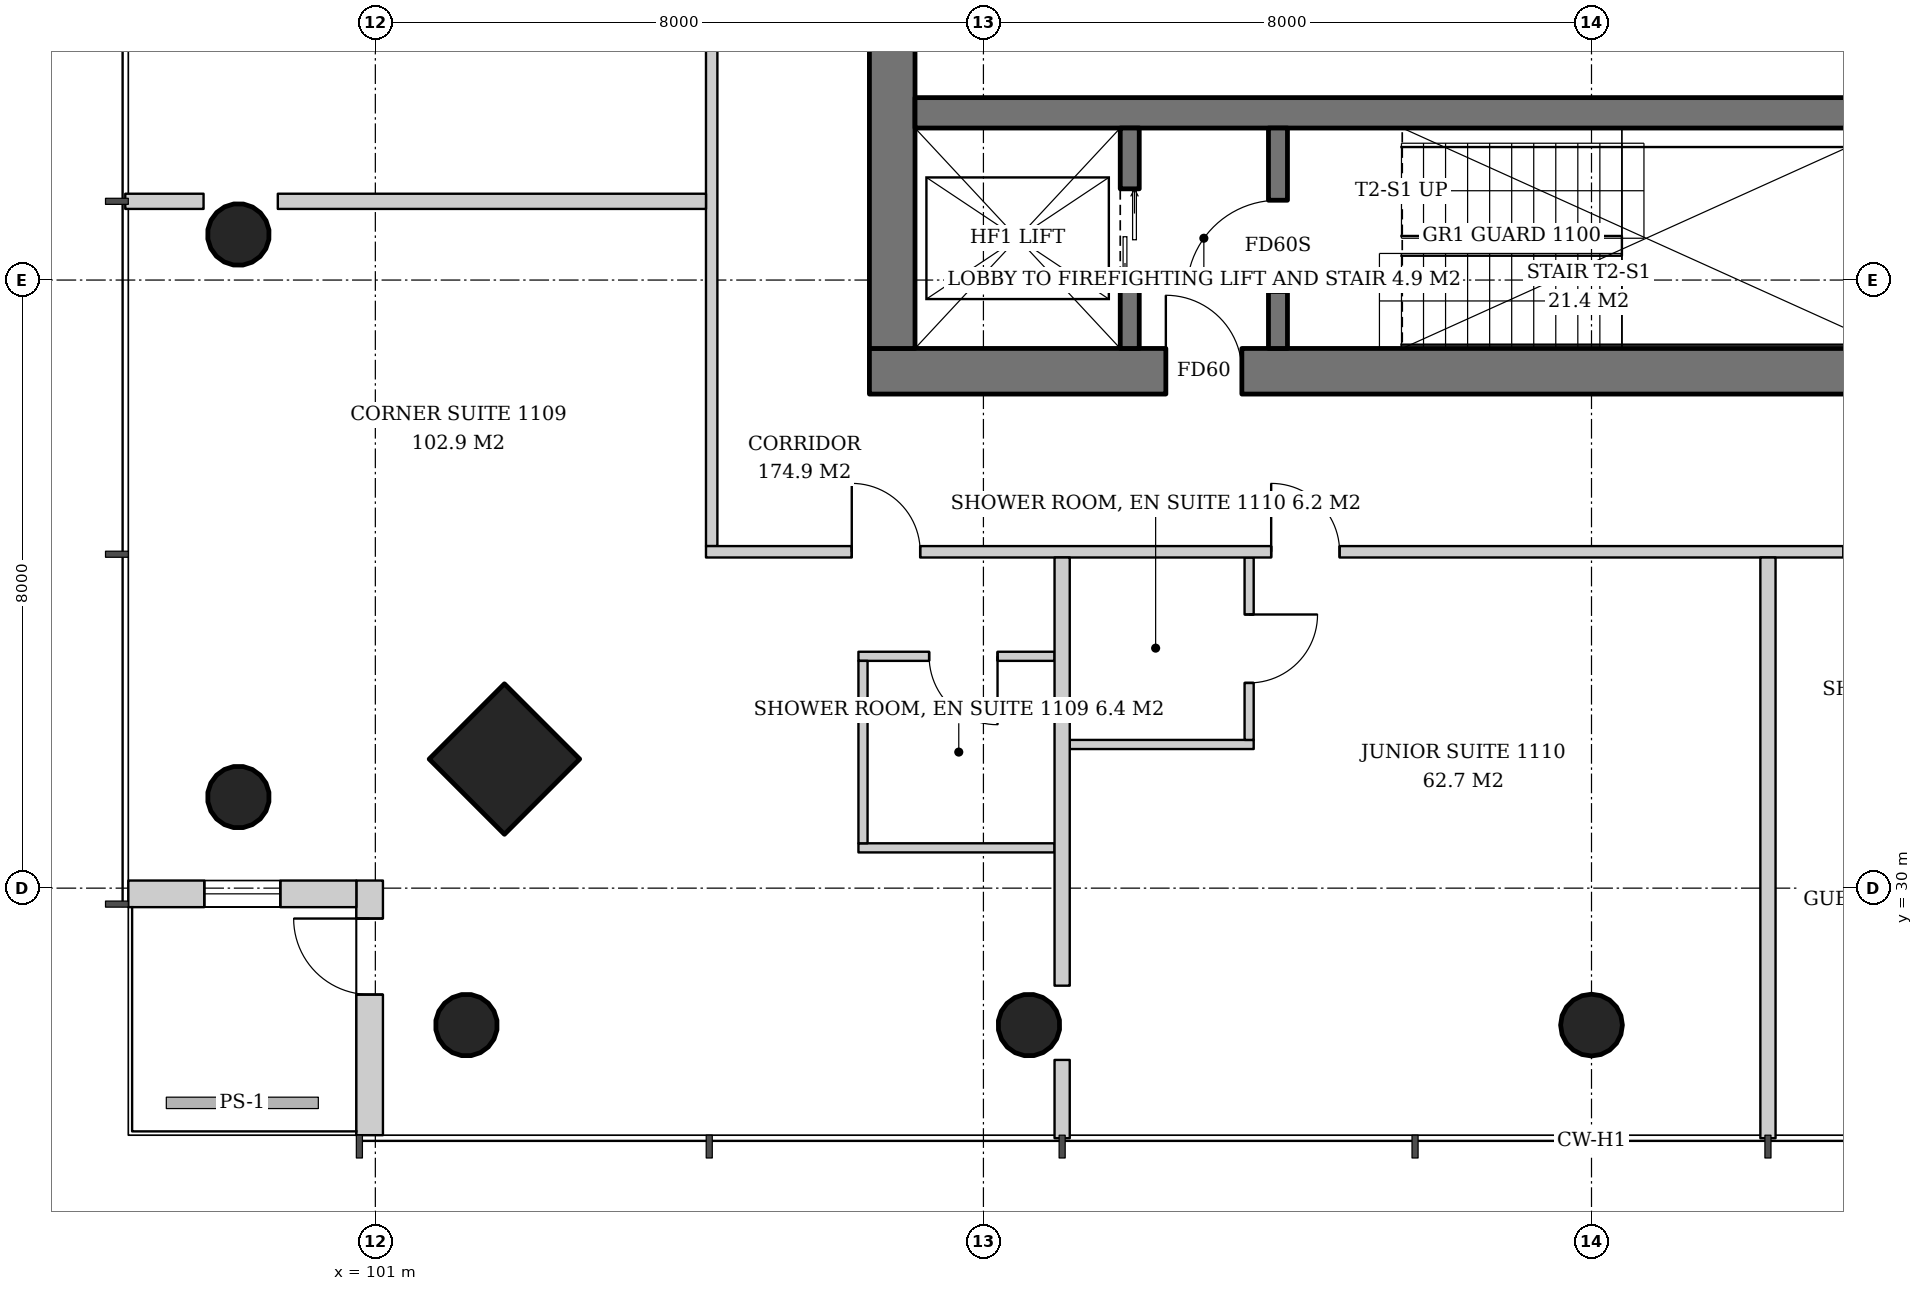
"""IFC4 building model, lengths in metres.
Left out: names, types, materials, properties, quantities, classifications, styles, units other than length and angle.
Written with IfcOpenShell. Run it as: python <this file> out.ifc"""

import sys

from ifc_helpers import new_model, si_unit, direction, frame, frame_2d, origin, origin_2d, place, context, subcontext, project, spatial, rectangle, hollow_circle, extrude, element, fill, save


model = new_model("IFC4")
c1 = context("Model", 3, precision=1e-05, world=origin(), true_north=direction((0.0, 1.0)))
c2 = subcontext(c1, "Body", "Model", "MODEL_VIEW")
j1 = project(units=[si_unit("LENGTHUNIT", "METRE"), si_unit("PLANEANGLEUNIT", "RADIAN")], contexts=[c1])
p1 = place(None, origin())
s1 = spatial("IfcSite", under=j1, at=p1, CompositionType="ELEMENT")
p2 = place(p1, origin())
s2 = spatial("IfcBuilding", under=s1, at=p2, CompositionType="ELEMENT")
p3 = place(p2, frame((0.0, 0.0, 47.6)))
s3 = spatial("IfcBuildingStorey", under=s2, at=p3, CompositionType="ELEMENT", Elevation=47.6)
p4 = place(p3, frame((102.646, 31.646, 0.0), z_axis=(0.043032401563, 0.043032401563, 0.998146494675), x_axis=(-0.707106781187, 0.707106781187, 0.0)))
e1 = element("IfcColumn", 1, at=p4, inside=s3, PredefinedType="COLUMN", context=c2, shape_type="SweptSolid", body=[
    extrude(rectangle(XDim=1.4, YDim=1.4, at=origin_2d()), origin(), (0.0, 0.0, 1.0), 3.807),
])
p5 = place(p3, frame((99.146, 31.146, 0.0), z_axis=(0.043032401563, 0.043032401563, 0.998146494675), x_axis=(-0.707106781187, 0.707106781187, 0.0)))
e2 = element("IfcColumn", 2, at=p5, inside=s3, PredefinedType="COLUMN", context=c2, shape_type="SweptSolid", body=[
    extrude(hollow_circle(Radius=0.406, WallThickness=0.03, at=origin_2d()), origin(), (0.0, 0.0, 1.0), 3.807),
])
p6 = place(p3, frame((99.146, 38.573, 0.0), z_axis=(0.043062285527, 0.021563230905, 0.998839660125), x_axis=(-0.44774654769, 0.894160516368, 0.0)))
e3 = element("IfcColumn", 3, at=p6, inside=s3, PredefinedType="COLUMN", context=c2, shape_type="SweptSolid", body=[
    extrude(hollow_circle(Radius=0.406, WallThickness=0.03, at=origin_2d()), origin(), (0.0, 0.0, 1.0), 3.804),
])
p7 = place(p3, frame((102.146, 28.146, 0.0), z_axis=(0.043032401563, 0.043032401563, 0.998146494675), x_axis=(-0.707106781187, 0.707106781187, 0.0)))
e4 = element("IfcColumn", 4, at=p7, inside=s3, PredefinedType="COLUMN", context=c2, shape_type="SweptSolid", body=[
    extrude(hollow_circle(Radius=0.406, WallThickness=0.03, at=origin_2d()), origin(), (0.0, 0.0, 1.0), 3.807),
])
p8 = place(p3, frame((109.573, 28.146, 0.0), z_axis=(0.021563230905, 0.043062285527, 0.998839660125), x_axis=(-0.894160516368, 0.44774654769, 0.0)))
e5 = element("IfcColumn", 5, at=p8, inside=s3, PredefinedType="COLUMN", context=c2, shape_type="SweptSolid", body=[
    extrude(hollow_circle(Radius=0.406, WallThickness=0.03, at=origin_2d()), origin(), (0.0, 0.0, 1.0), 3.804),
])
p9 = place(p3, frame((117.0, 28.146, 0.0), z_axis=(0.0, 0.043072300418, 0.999071957837), x_axis=(-1.0, 0.0, 0.0)))
e6 = element("IfcColumn", 6, at=p9, inside=s3, PredefinedType="COLUMN", context=c2, shape_type="SweptSolid", body=[
    extrude(hollow_circle(Radius=0.406, WallThickness=0.03, at=origin_2d()), origin(), (0.0, 0.0, 1.0), 3.803),
])
p10 = place(p3, frame((107.5, 36.8, 0.0), z_axis=(0.0, 0.0, 1.0), x_axis=(1.0, 0.0, 0.0)))
e7 = element("IfcWall", 7, at=p10, inside=s3, PredefinedType="SHEAR", context=c2, shape_type="SweptSolid", body=[
    extrude(rectangle(XDim=19.0, YDim=0.6, at=frame_2d((9.5, 0.0))), origin(), (0.0, 0.0, 1.0), 3.8),
])
p11 = place(p10, frame((3.9, 0.0, 0.0)))
e8 = element("IfcOpeningElement", 8, at=p11, cuts=e7, PredefinedType="OPENING", context=c2, shape_type="SweptSolid", body=[
    extrude(rectangle(XDim=1.0, YDim=2.1, at=frame_2d((0.5, 1.05))), frame((0.0, 0.31, 0.0), z_axis=(0.0, -1.0, 0.0), x_axis=(1.0, 0.0, 0.0)), (0.0, 0.0, 1.0), 0.62),
])
p12 = place(p10, frame((14.153, 0.0, 0.0)))
e9 = element("IfcOpeningElement", 9, at=p12, cuts=e7, PredefinedType="OPENING", context=c2, shape_type="SweptSolid", body=[
    extrude(rectangle(XDim=1.0, YDim=2.1, at=frame_2d((0.5, 1.05))), frame((0.0, 0.31, 0.0), z_axis=(0.0, -1.0, 0.0), x_axis=(1.0, 0.0, 0.0)), (0.0, 0.0, 1.0), 0.62),
])
p13 = place(p10, frame((15.725, 0.0, 0.0)))
e10 = element("IfcOpeningElement", 10, at=p13, cuts=e7, PredefinedType="OPENING", context=c2, shape_type="SweptSolid", body=[
    extrude(rectangle(XDim=1.0, YDim=2.1, at=frame_2d((0.5, 1.05))), frame((0.0, 0.31, 0.0), z_axis=(0.0, -1.0, 0.0), x_axis=(1.0, 0.0, 0.0)), (0.0, 0.0, 1.0), 0.62),
])
p14 = place(p10, frame((17.188, 0.0, 0.0)))
e11 = element("IfcOpeningElement", 11, at=p14, cuts=e7, PredefinedType="OPENING", context=c2, shape_type="SweptSolid", body=[
    extrude(rectangle(XDim=1.0, YDim=2.1, at=frame_2d((0.5, 1.05))), frame((0.0, 0.31, 0.0), z_axis=(0.0, -1.0, 0.0), x_axis=(1.0, 0.0, 0.0)), (0.0, 0.0, 1.0), 0.62),
])
p15 = place(p3, frame((107.8, 37.1, 0.0), z_axis=(0.0, 0.0, 1.0), x_axis=(0.0, 1.0, 0.0)))
e12 = element("IfcWall", 12, at=p15, inside=s3, PredefinedType="SHEAR", context=c2, shape_type="SweptSolid", body=[
    extrude(rectangle(XDim=17.8, YDim=0.6, at=frame_2d((8.9, 0.0))), origin(), (0.0, 0.0, 1.0), 3.8),
])
p16 = place(p15, frame((8.0, 0.0, 0.0)))
e13 = element("IfcOpeningElement", 13, at=p16, cuts=e12, PredefinedType="OPENING", context=c2, shape_type="SweptSolid", body=[
    extrude(rectangle(XDim=1.8, YDim=2.4, at=frame_2d((0.9, 1.2))), frame((0.0, 0.31, 0.0), z_axis=(0.0, -1.0, 0.0), x_axis=(1.0, 0.0, 0.0)), (0.0, 0.0, 1.0), 0.62),
])
p17 = place(p3, frame((108.1, 40.2, 0.0), z_axis=(0.0, 0.0, 1.0), x_axis=(1.0, 0.0, 0.0)))
e14 = element("IfcWall", 14, at=p17, inside=s3, PredefinedType="SHEAR", context=c2, shape_type="SweptSolid", body=[
    extrude(rectangle(XDim=17.8, YDim=0.4, at=frame_2d((8.9, 0.0))), origin(), (0.0, 0.0, 1.0), 3.8),
])
p18 = place(p3, frame((100.925, 26.75, 0.0), z_axis=(0.0, 0.0, 1.0), x_axis=(0.0, 1.0, 0.0)))
e15 = element("IfcWall", 15, at=p18, inside=s3, PredefinedType="SOLIDWALL", context=c2, shape_type="SweptSolid", body=[
    extrude(rectangle(XDim=3.35, YDim=0.35, at=frame_2d((1.675, 0.0))), origin(), (0.0, 0.0, 1.0), 3.6),
])
p19 = place(p18, frame((1.85, 0.0, 0.0)))
e16 = element("IfcOpeningElement", 16, at=p19, cuts=e15, PredefinedType="OPENING", context=c2, shape_type="SweptSolid", body=[
    extrude(rectangle(XDim=1.0, YDim=2.4, at=frame_2d((0.5, 1.2))), frame((0.0, 0.185, 0.0), z_axis=(0.0, -1.0, 0.0), x_axis=(1.0, 0.0, 0.0)), (0.0, 0.0, 1.0), 0.37),
])
p20 = place(p3, frame((100.75, 29.925, 0.0), z_axis=(0.0, 0.0, 1.0), x_axis=(-1.0, 0.0, 0.0)))
e17 = element("IfcWall", 17, at=p20, inside=s3, PredefinedType="SOLIDWALL", context=c2, shape_type="SweptSolid", body=[
    extrude(rectangle(XDim=3.0, YDim=0.35, at=frame_2d((1.5, 0.0))), origin(), (0.0, 0.0, 1.0), 3.6),
])
p21 = place(p20, frame((1.0, 0.0, 0.9)))
e18 = element("IfcOpeningElement", 18, at=p21, cuts=e17, PredefinedType="OPENING", context=c2, shape_type="SweptSolid", body=[
    extrude(rectangle(XDim=1.0, YDim=2.4, at=frame_2d((0.5, 1.2))), frame((0.0, 0.185, 0.0), z_axis=(0.0, -1.0, 0.0), x_axis=(1.0, 0.0, 0.0)), (0.0, 0.0, 1.0), 0.37),
])
p22 = place(p3, frame((110.925, 37.1, 0.0), z_axis=(0.0, 0.0, 1.0), x_axis=(0.0, 1.0, 0.0)))
e19 = element("IfcWall", 19, at=p22, inside=s3, PredefinedType="SHEAR", context=c2, shape_type="SweptSolid", body=[
    extrude(rectangle(XDim=2.9, YDim=0.25, at=frame_2d((1.45, 0.0))), origin(), (0.0, 0.0, 1.0), 3.8),
])
p23 = place(p22, frame((0.8, 0.0, 0.0)))
e20 = element("IfcOpeningElement", 20, at=p23, cuts=e19, PredefinedType="OPENING", context=c2, shape_type="SweptSolid", body=[
    extrude(rectangle(XDim=1.3, YDim=2.2, at=frame_2d((0.65, 1.1))), frame((0.0, 0.135, 0.0), z_axis=(0.0, -1.0, 0.0), x_axis=(1.0, 0.0, 0.0)), (0.0, 0.0, 1.0), 0.27),
])
p24 = place(p3, frame((112.875, 37.1, 0.0), z_axis=(0.0, 0.0, 1.0), x_axis=(0.0, 1.0, 0.0)))
e21 = element("IfcWall", 21, at=p24, inside=s3, PredefinedType="SHEAR", context=c2, shape_type="SweptSolid", body=[
    extrude(rectangle(XDim=2.9, YDim=0.25, at=frame_2d((1.45, 0.0))), origin(), (0.0, 0.0, 1.0), 3.8),
])
p25 = place(p24, frame((0.75, 0.0, 0.0)))
e22 = element("IfcOpeningElement", 22, at=p25, cuts=e21, PredefinedType="OPENING", context=c2, shape_type="SweptSolid", body=[
    extrude(rectangle(XDim=1.2, YDim=2.1, at=frame_2d((0.6, 1.05))), frame((0.0, 0.135, 0.0), z_axis=(0.0, -1.0, 0.0), x_axis=(1.0, 0.0, 0.0)), (0.0, 0.0, 1.0), 0.27),
])
p26 = place(p3, frame((105.425, 57.65, 0.0), z_axis=(0.0, 0.0, 1.0), x_axis=(0.0, -1.0, 0.0)))
e23 = element("IfcWall", 23, at=p26, inside=s3, PredefinedType="PARTITIONING", context=c2, shape_type="SweptSolid", body=[
    extrude(rectangle(XDim=23.15, YDim=0.15, at=frame_2d((11.575, 0.0))), origin(), (0.0, 0.0, 1.0), 2.8),
])
p27 = place(p26, frame((1.918, 0.0, 0.0)))
e24 = element("IfcOpeningElement", 24, at=p27, cuts=e23, PredefinedType="OPENING", context=c2, shape_type="SweptSolid", body=[
    extrude(rectangle(XDim=0.9, YDim=2.1, at=frame_2d((0.45, 1.05))), frame((0.0, 0.085, 0.0), z_axis=(0.0, -1.0, 0.0), x_axis=(1.0, 0.0, 0.0)), (0.0, 0.0, 1.0), 0.17),
])
p28 = place(p26, frame((7.386, 0.0, 0.0)))
e25 = element("IfcOpeningElement", 25, at=p28, cuts=e23, PredefinedType="OPENING", context=c2, shape_type="SweptSolid", body=[
    extrude(rectangle(XDim=1.0, YDim=2.1, at=frame_2d((0.5, 1.05))), frame((0.0, 0.085, 0.0), z_axis=(0.0, -1.0, 0.0), x_axis=(1.0, 0.0, 0.0)), (0.0, 0.0, 1.0), 0.17),
])
p29 = place(p26, frame((12.079, 0.0, 0.0)))
e26 = element("IfcOpeningElement", 26, at=p29, cuts=e23, PredefinedType="OPENING", context=c2, shape_type="SweptSolid", body=[
    extrude(rectangle(XDim=0.9, YDim=2.1, at=frame_2d((0.45, 1.05))), frame((0.0, 0.085, 0.0), z_axis=(0.0, -1.0, 0.0), x_axis=(1.0, 0.0, 0.0)), (0.0, 0.0, 1.0), 0.17),
])
p30 = place(p3, frame((105.35, 39.036, 0.0), z_axis=(0.0, 0.0, 1.0), x_axis=(-1.0, 0.0, 0.0)))
e27 = element("IfcWall", 27, at=p30, inside=s3, PredefinedType="PARTITIONING", context=c2, shape_type="SweptSolid", body=[
    extrude(rectangle(XDim=5.633, YDim=0.2, at=frame_2d((2.817, 0.0))), origin(), (0.0, 0.0, 1.0), 3.6),
])
p31 = place(p3, frame((98.74, 39.036, 0.0), z_axis=(0.0, 0.0, 1.0), x_axis=(-1.0, 0.0, 0.0)))
e28 = element("IfcWall", 28, at=p31, inside=s3, PredefinedType="PARTITIONING", context=c2, shape_type="SweptSolid", body=[
    extrude(rectangle(XDim=1.03, YDim=0.2, at=frame_2d((0.515, 0.0))), origin(), (0.0, 0.0, 1.0), 3.6),
])
p32 = place(p3, frame((109.936, 33.05, 0.0), z_axis=(0.0, 0.0, 1.0), x_axis=(-1.0, 0.0, 0.0)))
e29 = element("IfcWall", 29, at=p32, inside=s3, PredefinedType="PARTITIONING", context=c2, shape_type="SweptSolid", body=[
    extrude(rectangle(XDim=2.58, YDim=0.12, at=frame_2d((1.29, 0.0))), origin(), (0.0, 0.0, 1.0), 2.8),
])
p33 = place(p32, frame((0.75, 0.0, 0.0)))
e30 = element("IfcOpeningElement", 30, at=p33, cuts=e29, PredefinedType="OPENING", context=c2, shape_type="SweptSolid", body=[
    extrude(rectangle(XDim=0.9, YDim=2.1, at=frame_2d((0.45, 1.05))), frame((0.0, 0.07, 0.0), z_axis=(0.0, -1.0, 0.0), x_axis=(1.0, 0.0, 0.0)), (0.0, 0.0, 1.0), 0.14),
])
p34 = place(p3, frame((109.936, 30.53, 0.0), z_axis=(0.0, 0.0, 1.0), x_axis=(-1.0, 0.0, 0.0)))
e31 = element("IfcWall", 31, at=p34, inside=s3, PredefinedType="PARTITIONING", context=c2, shape_type="SweptSolid", body=[
    extrude(rectangle(XDim=2.58, YDim=0.12, at=frame_2d((1.29, 0.0))), origin(), (0.0, 0.0, 1.0), 2.8),
])
p35 = place(p3, frame((107.416, 32.99, 0.0), z_axis=(0.0, 0.0, 1.0), x_axis=(0.0, -1.0, 0.0)))
e32 = element("IfcWall", 32, at=p35, inside=s3, PredefinedType="PARTITIONING", context=c2, shape_type="SweptSolid", body=[
    extrude(rectangle(XDim=2.4, YDim=0.12, at=frame_2d((1.2, 0.0))), origin(), (0.0, 0.0, 1.0), 2.847),
])
p36 = place(p3, frame((110.136, 31.89, 0.0), z_axis=(0.0, 0.0, 1.0), x_axis=(1.0, 0.0, 0.0)))
e33 = element("IfcWall", 33, at=p36, inside=s3, PredefinedType="PARTITIONING", context=c2, shape_type="SweptSolid", body=[
    extrude(rectangle(XDim=2.42, YDim=0.12, at=frame_2d((1.21, 0.0))), origin(), (0.0, 0.0, 1.0), 2.847),
])
p37 = place(p3, frame((112.496, 34.35, 0.0), z_axis=(0.0, 0.0, 1.0), x_axis=(0.0, -1.0, 0.0)))
e34 = element("IfcWall", 34, at=p37, inside=s3, PredefinedType="PARTITIONING", context=c2, shape_type="SweptSolid", body=[
    extrude(rectangle(XDim=2.4, YDim=0.12, at=frame_2d((1.2, 0.0))), origin(), (0.0, 0.0, 1.0), 3.6),
])
p38 = place(p37, frame((0.75, 0.0, 0.0)))
e35 = element("IfcOpeningElement", 35, at=p38, cuts=e34, PredefinedType="OPENING", context=c2, shape_type="SweptSolid", body=[
    extrude(rectangle(XDim=0.9, YDim=2.1, at=frame_2d((0.45, 1.05))), frame((0.0, 0.07, 0.0), z_axis=(0.0, -1.0, 0.0), x_axis=(1.0, 0.0, 0.0)), (0.0, 0.0, 1.0), 0.14),
])
p39 = place(p3, frame((105.35, 34.425, 0.0), z_axis=(0.0, 0.0, 1.0), x_axis=(1.0, 0.0, 0.0)))
e36 = element("IfcWall", 36, at=p39, inside=s3, PredefinedType="PARTITIONING", context=c2, shape_type="SweptSolid", body=[
    extrude(rectangle(XDim=23.15, YDim=0.15, at=frame_2d((11.575, 0.0))), origin(), (0.0, 0.0, 1.0), 2.8),
])
p40 = place(p39, frame((1.918, 0.0, 0.0)))
e37 = element("IfcOpeningElement", 37, at=p40, cuts=e36, PredefinedType="OPENING", context=c2, shape_type="SweptSolid", body=[
    extrude(rectangle(XDim=0.9, YDim=2.1, at=frame_2d((0.45, 1.05))), frame((0.0, 0.085, 0.0), z_axis=(0.0, -1.0, 0.0), x_axis=(1.0, 0.0, 0.0)), (0.0, 0.0, 1.0), 0.17),
])
p41 = place(p39, frame((7.436, 0.0, 0.0)))
e38 = element("IfcOpeningElement", 38, at=p41, cuts=e36, PredefinedType="OPENING", context=c2, shape_type="SweptSolid", body=[
    extrude(rectangle(XDim=0.9, YDim=2.1, at=frame_2d((0.45, 1.05))), frame((0.0, 0.085, 0.0), z_axis=(0.0, -1.0, 0.0), x_axis=(1.0, 0.0, 0.0)), (0.0, 0.0, 1.0), 0.17),
])
p42 = place(p39, frame((14.964, 0.0, 0.0)))
e39 = element("IfcOpeningElement", 39, at=p42, cuts=e36, PredefinedType="OPENING", context=c2, shape_type="SweptSolid", body=[
    extrude(rectangle(XDim=0.9, YDim=2.1, at=frame_2d((0.45, 1.05))), frame((0.0, 0.085, 0.0), z_axis=(0.0, -1.0, 0.0), x_axis=(1.0, 0.0, 0.0)), (0.0, 0.0, 1.0), 0.17),
])
p43 = place(p3, frame((110.036, 34.35, 0.0), z_axis=(0.0, 0.0, 1.0), x_axis=(0.0, -1.0, 0.0)))
e40 = element("IfcWall", 40, at=p43, inside=s3, PredefinedType="PARTITIONING", context=c2, shape_type="SweptSolid", body=[
    extrude(rectangle(XDim=5.633, YDim=0.2, at=frame_2d((2.817, 0.0))), origin(), (0.0, 0.0, 1.0), 3.6),
])
p44 = place(p3, frame((110.036, 27.74, 0.0), z_axis=(0.0, 0.0, 1.0), x_axis=(0.0, -1.0, 0.0)))
e41 = element("IfcWall", 41, at=p44, inside=s3, PredefinedType="PARTITIONING", context=c2, shape_type="SweptSolid", body=[
    extrude(rectangle(XDim=1.03, YDim=0.2, at=frame_2d((0.515, 0.0))), origin(), (0.0, 0.0, 1.0), 3.6),
])
p45 = place(p3, frame((119.322, 34.35, 0.0), z_axis=(0.0, 0.0, 1.0), x_axis=(0.0, -1.0, 0.0)))
e42 = element("IfcWall", 42, at=p45, inside=s3, PredefinedType="PARTITIONING", context=c2, shape_type="SweptSolid", body=[
    extrude(rectangle(XDim=7.64, YDim=0.2, at=frame_2d((3.82, 0.0))), origin(), (0.0, 0.0, 1.0), 3.05),
])
p46 = place(p19, origin())
e43 = element("IfcDoor", 43, at=p46, inside=s3, OperationType="SINGLE_SWING_RIGHT", PredefinedType="DOOR", context=c2, shape_type="SweptSolid", body=[
    extrude(rectangle(XDim=1.0, YDim=2.4, at=frame_2d((0.5, 1.2))), frame((0.0, 0.025, 0.0), z_axis=(0.0, -1.0, 0.0), x_axis=(1.0, 0.0, 0.0)), (0.0, 0.0, 1.0), 0.05),
])
fill(e16, e43)
p47 = place(p21, origin())
e44 = element("IfcWindow", 44, at=p47, inside=s3, PartitioningType="SINGLE_PANEL", PredefinedType="WINDOW", context=c2, shape_type="SweptSolid", body=[
    extrude(rectangle(XDim=1.0, YDim=2.4, at=frame_2d((0.5, 1.2))), frame((0.0, 0.03, 0.0), z_axis=(0.0, -1.0, 0.0), x_axis=(1.0, 0.0, 0.0)), (0.0, 0.0, 1.0), 0.06),
])
fill(e18, e44)
p48 = place(p23, origin())
e45 = element("IfcDoor", 45, at=p48, inside=s3, OperationType="DOUBLE_DOOR_SLIDING", PredefinedType="DOOR", context=c2, shape_type="SweptSolid", body=[
    extrude(rectangle(XDim=1.3, YDim=2.2, at=frame_2d((0.65, 1.1))), frame((0.0, 0.025, 0.0), z_axis=(0.0, -1.0, 0.0), x_axis=(1.0, 0.0, 0.0)), (0.0, 0.0, 1.0), 0.05),
])
fill(e20, e45)
p49 = place(p25, origin())
e46 = element("IfcDoor", 46, at=p49, inside=s3, OperationType="SINGLE_SWING_LEFT", PredefinedType="DOOR", context=c2, shape_type="SweptSolid", body=[
    extrude(rectangle(XDim=1.2, YDim=2.1, at=frame_2d((0.6, 1.05))), frame((0.0, 0.025, 0.0), z_axis=(0.0, -1.0, 0.0), x_axis=(1.0, 0.0, 0.0)), (0.0, 0.0, 1.0), 0.05),
])
fill(e22, e46)
p50 = place(p11, origin())
e47 = element("IfcDoor", 47, at=p50, inside=s3, OperationType="SINGLE_SWING_LEFT", PredefinedType="DOOR", context=c2, shape_type="SweptSolid", body=[
    extrude(rectangle(XDim=1.0, YDim=2.1, at=frame_2d((0.5, 1.05))), frame((0.0, 0.025, 0.0), z_axis=(0.0, -1.0, 0.0), x_axis=(1.0, 0.0, 0.0)), (0.0, 0.0, 1.0), 0.05),
])
fill(e8, e47)
p51 = place(p33, origin())
e48 = element("IfcDoor", 48, at=p51, inside=s3, OperationType="SINGLE_SWING_LEFT", PredefinedType="DOOR", context=c2, shape_type="SweptSolid", body=[
    extrude(rectangle(XDim=0.9, YDim=2.1, at=frame_2d((0.45, 1.05))), frame((0.0, 0.025, 0.0), z_axis=(0.0, -1.0, 0.0), x_axis=(1.0, 0.0, 0.0)), (0.0, 0.0, 1.0), 0.05),
])
fill(e30, e48)
p52 = place(p38, origin())
e49 = element("IfcDoor", 49, at=p52, inside=s3, OperationType="SINGLE_SWING_LEFT", PredefinedType="DOOR", context=c2, shape_type="SweptSolid", body=[
    extrude(rectangle(XDim=0.9, YDim=2.1, at=frame_2d((0.45, 1.05))), frame((0.0, 0.025, 0.0), z_axis=(0.0, -1.0, 0.0), x_axis=(1.0, 0.0, 0.0)), (0.0, 0.0, 1.0), 0.05),
])
fill(e35, e49)
p53 = place(p40, origin())
e50 = element("IfcDoor", 50, at=p53, inside=s3, OperationType="SINGLE_SWING_LEFT", PredefinedType="DOOR", context=c2, shape_type="SweptSolid", body=[
    extrude(rectangle(XDim=0.9, YDim=2.1, at=frame_2d((0.45, 1.05))), frame((0.0, 0.025, 0.0), z_axis=(0.0, -1.0, 0.0), x_axis=(1.0, 0.0, 0.0)), (0.0, 0.0, 1.0), 0.05),
])
fill(e37, e50)
p54 = place(p41, origin())
e51 = element("IfcDoor", 51, at=p54, inside=s3, OperationType="SINGLE_SWING_LEFT", PredefinedType="DOOR", context=c2, shape_type="SweptSolid", body=[
    extrude(rectangle(XDim=0.9, YDim=2.1, at=frame_2d((0.45, 1.05))), frame((0.0, 0.025, 0.0), z_axis=(0.0, -1.0, 0.0), x_axis=(1.0, 0.0, 0.0)), (0.0, 0.0, 1.0), 0.05),
])
fill(e38, e51)
p55 = place(p42, origin())
e52 = element("IfcDoor", 52, at=p55, inside=s3, OperationType="SINGLE_SWING_RIGHT", PredefinedType="DOOR", context=c2, shape_type="SweptSolid", body=[
    extrude(rectangle(XDim=0.9, YDim=2.1, at=frame_2d((0.45, 1.05))), frame((0.0, 0.025, 0.0), z_axis=(0.0, -1.0, 0.0), x_axis=(1.0, 0.0, 0.0)), (0.0, 0.0, 1.0), 0.05),
])
fill(e39, e52)
save(model, sys.argv[1])
